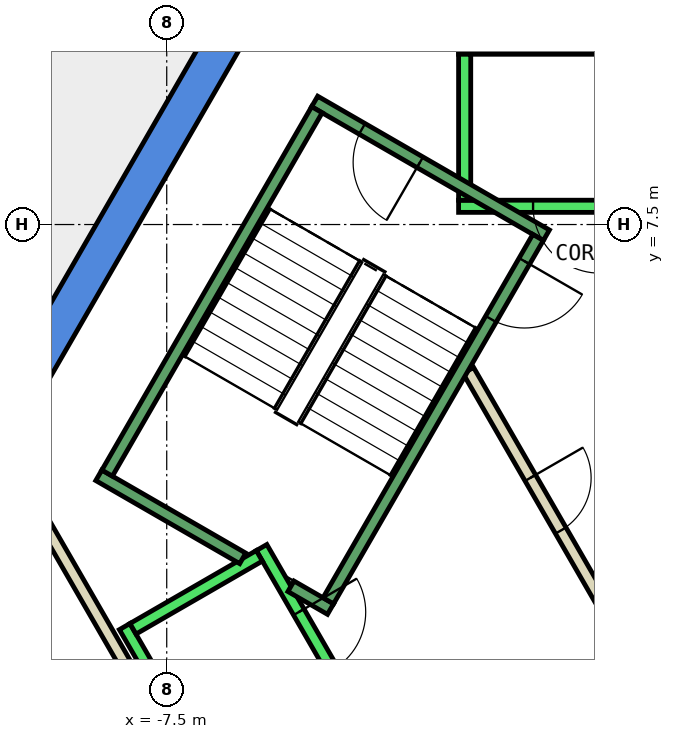
"""IFC4 building model, lengths in metres.
Left out: names, types, materials, properties, quantities, classifications, styles, units other than length and angle.
Written with IfcOpenShell. Run it as: python <this file> out.ifc"""

import sys

from ifc_helpers import new_model, si_unit, direction, frame, frame_2d, origin, place, context, subcontext, project, spatial, polyline, rectangle, outline, extrude, element, fill, save


model = new_model("IFC4")
c1 = context("Model", 3, precision=1e-05, world=origin(), true_north=direction((0.0, 1.0)))
c2 = subcontext(c1, "Body", "Model", "MODEL_VIEW")
j1 = project(units=[si_unit("LENGTHUNIT", "METRE"), si_unit("PLANEANGLEUNIT", "RADIAN")], contexts=[c1])
p1 = place(None, origin())
s1 = spatial("IfcSite", under=j1, at=p1, CompositionType="ELEMENT")
p2 = place(p1, origin())
s2 = spatial("IfcBuilding", under=s1, at=p2, CompositionType="ELEMENT")
p3 = place(p2, frame((0.0, 0.0, 255.8)))
s3 = spatial("IfcBuildingStorey", under=s2, at=p3, CompositionType="ELEMENT", Elevation=255.8)
p4 = place(p3, frame((0.0, 0.0, -0.34)))
e1 = element("IfcWall", 1, at=p4, inside=s3, PredefinedType="SHEAR", context=c2, shape_type="SweptSolid", body=[
    extrude(outline(polyline([(-10.535, 4.253), (-10.015, 3.953), (-5.427, 11.9), (-5.774, 12.5), (-10.535, 4.253)])), origin(), (0.0, 0.0, 1.0), 3.6),
])
p5 = place(p3, frame((0.0, 0.0, -0.34)))
e2 = element("IfcWall", 2, at=p5, inside=s3, PredefinedType="SHEAR", context=c2, shape_type="SweptSolid", body=[
    extrude(outline(polyline([(-11.547, 2.5), (-5.774, -7.5), (-5.427, -6.9), (-10.854, 2.5), (-11.547, 2.5)])), origin(), (0.0, 0.0, 1.0), 3.6),
])
p6 = place(p3, frame((-10.498, 9.689, 0.0), z_axis=(0.0, 0.0, 1.0), x_axis=(0.516353342298, 0.856375633643, 0.0)))
e3 = element("IfcWall", 3, at=p6, inside=s3, PredefinedType="PARTITIONING", context=c2, shape_type="SweptSolid", body=[
    extrude(rectangle(XDim=4.288, YDim=0.2, at=frame_2d((2.144, 0.0))), origin(), (0.0, 0.0, 1.0), 3.26),
])
p7 = place(p6, frame((1.694, 0.0, 0.0)))
e4 = element("IfcOpeningElement", 4, at=p7, cuts=e3, PredefinedType="OPENING", context=c2, shape_type="SweptSolid", body=[
    extrude(rectangle(XDim=1.0, YDim=2.1, at=frame_2d((0.5, 1.05))), frame((0.0, 0.11, 0.0), z_axis=(0.0, -1.0, 0.0), x_axis=(1.0, 0.0, 0.0)), (0.0, 0.0, 1.0), 0.22),
])
p8 = place(p3, frame((-9.751, 2.99, 0.0), z_axis=(0.0, 0.0, 1.0), x_axis=(0.499955951776, -0.866050833545, 0.0)))
e5 = element("IfcWall", 5, at=p8, inside=s3, PredefinedType="PARTITIONING", context=c2, shape_type="SweptSolid", body=[
    extrude(rectangle(XDim=5.4, YDim=0.2, at=frame_2d((2.7, 0.0))), origin(), (0.0, 0.0, 1.0), 3.26),
])
p9 = place(p3, frame((-0.982, -1.0, 0.0), z_axis=(0.0, 0.0, 1.0), x_axis=(0.50024047865, 0.865886518847, 0.0)))
e6 = element("IfcWall", 6, at=p9, inside=s3, PredefinedType="PARTITIONING", context=c2, shape_type="SweptSolid", body=[
    extrude(rectangle(XDim=1.863, YDim=0.2, at=frame_2d((0.931, 0.0))), origin(), (0.0, 0.0, 1.0), 3.26),
])
p10 = place(p3, frame((-2.54, 5.1, 0.0), z_axis=(0.0, 0.0, 1.0), x_axis=(0.499925051871, -0.866068670783, 0.0)))
e7 = element("IfcWall", 7, at=p10, inside=s3, PredefinedType="PARTITIONING", context=c2, shape_type="SweptSolid", body=[
    extrude(rectangle(XDim=5.181, YDim=0.2, at=frame_2d((2.59, 0.0))), origin(), (0.0, 0.0, 1.0), 3.26),
])
p11 = place(p10, frame((2.04, 0.0, 0.0)))
e8 = element("IfcOpeningElement", 8, at=p11, cuts=e7, PredefinedType="OPENING", context=c2, shape_type="SweptSolid", body=[
    extrude(rectangle(XDim=1.0, YDim=2.1, at=frame_2d((0.5, 1.05))), frame((0.0, 0.11, 0.0), z_axis=(0.0, -1.0, 0.0), x_axis=(1.0, 0.0, 0.0)), (0.0, 0.0, 1.0), 0.22),
])
p12 = place(p3, frame((-9.25, -4.879, 0.0), z_axis=(0.0, 0.0, 1.0), x_axis=(-0.499944124422, 0.866057661161, 0.0)))
e9 = element("IfcWall", 9, at=p12, inside=s3, PredefinedType="PARTITIONING", context=c2, shape_type="SweptSolid", body=[
    extrude(rectangle(XDim=7.405, YDim=0.2, at=frame_2d((3.702, 0.0))), origin(), (0.0, 0.0, 1.0), 3.26),
])
p13 = place(p12, frame((2.533, 0.0, 0.0)))
e10 = element("IfcOpeningElement", 10, at=p13, cuts=e9, PredefinedType="OPENING", context=c2, shape_type="SweptSolid", body=[
    extrude(rectangle(XDim=0.9, YDim=2.1, at=frame_2d((0.45, 1.05))), frame((0.0, 0.11, 0.0), z_axis=(0.0, -1.0, 0.0), x_axis=(1.0, 0.0, 0.0)), (0.0, 0.0, 1.0), 0.22),
])
p14 = place(p3, frame((2.7, 7.8, 0.0), z_axis=(0.0, 0.0, 1.0), x_axis=(-1.0, 0.0, 0.0)))
e11 = element("IfcWall", 11, at=p14, inside=s3, PredefinedType="STANDARD", context=c2, shape_type="SweptSolid", body=[
    extrude(rectangle(XDim=5.4, YDim=0.2, at=frame_2d((2.7, 0.0))), origin(), (0.0, 0.0, 1.0), 3.26),
])
p15 = place(p14, frame((1.225, 0.0, 0.0)))
e12 = element("IfcOpeningElement", 12, at=p15, cuts=e11, PredefinedType="OPENING", context=c2, shape_type="SweptSolid", body=[
    extrude(rectangle(XDim=1.1, YDim=2.1, at=frame_2d((0.55, 1.05))), frame((0.0, 0.11, 0.0), z_axis=(0.0, -1.0, 0.0), x_axis=(1.0, 0.0, 0.0)), (0.0, 0.0, 1.0), 0.22),
])
p16 = place(p14, frame((3.075, 0.0, 0.0)))
e13 = element("IfcOpeningElement", 13, at=p16, cuts=e11, PredefinedType="OPENING", context=c2, shape_type="SweptSolid", body=[
    extrude(rectangle(XDim=1.1, YDim=2.1, at=frame_2d((0.55, 1.05))), frame((0.0, 0.11, 0.0), z_axis=(0.0, -1.0, 0.0), x_axis=(1.0, 0.0, 0.0)), (0.0, 0.0, 1.0), 0.22),
])
p17 = place(p3, frame((2.7, 10.4, 0.0), z_axis=(0.0, 0.0, 1.0), x_axis=(-1.0, 0.0, 0.0)))
e14 = element("IfcWall", 14, at=p17, inside=s3, PredefinedType="STANDARD", context=c2, shape_type="SweptSolid", body=[
    extrude(rectangle(XDim=5.4, YDim=0.2, at=frame_2d((2.7, 0.0))), origin(), (0.0, 0.0, 1.0), 3.26),
])
p18 = place(p3, frame((-2.6, 7.9, 0.0), z_axis=(0.0, 0.0, 1.0), x_axis=(0.0, 1.0, 0.0)))
e15 = element("IfcWall", 15, at=p18, inside=s3, PredefinedType="STANDARD", context=c2, shape_type="SweptSolid", body=[
    extrude(rectangle(XDim=2.4, YDim=0.2, at=frame_2d((1.2, 0.0))), origin(), (0.0, 0.0, 1.0), 3.26),
])
p19 = place(p3, frame((-5.94, 2.188, 0.0), z_axis=(0.0, 0.0, 1.0), x_axis=(0.500034260056, -0.866005622828, 0.0)))
e16 = element("IfcWall", 16, at=p19, inside=s3, PredefinedType="STANDARD", context=c2, shape_type="SweptSolid", body=[
    extrude(rectangle(XDim=5.399, YDim=0.2, at=frame_2d((2.7, 0.0))), origin(), (0.0, 0.0, 1.0), 3.26),
])
p20 = place(p19, frame((3.075, 0.0, 0.0)))
e17 = element("IfcOpeningElement", 17, at=p20, cuts=e16, PredefinedType="OPENING", context=c2, shape_type="SweptSolid", body=[
    extrude(rectangle(XDim=1.1, YDim=2.1, at=frame_2d((0.55, 1.05))), frame((0.0, 0.11, 0.0), z_axis=(0.0, -1.0, 0.0), x_axis=(1.0, 0.0, 0.0)), (0.0, 0.0, 1.0), 0.22),
])
p21 = place(p19, frame((1.225, 0.0, 0.0)))
e18 = element("IfcOpeningElement", 18, at=p21, cuts=e16, PredefinedType="OPENING", context=c2, shape_type="SweptSolid", body=[
    extrude(rectangle(XDim=1.1, YDim=2.1, at=frame_2d((0.55, 1.05))), frame((0.0, 0.11, 0.0), z_axis=(0.0, -1.0, 0.0), x_axis=(1.0, 0.0, 0.0)), (0.0, 0.0, 1.0), 0.22),
])
p22 = place(p3, frame((-8.192, 0.888, 0.0), z_axis=(0.0, 0.0, 1.0), x_axis=(0.500034260056, -0.866005622828, 0.0)))
e19 = element("IfcWall", 19, at=p22, inside=s3, PredefinedType="STANDARD", context=c2, shape_type="SweptSolid", body=[
    extrude(rectangle(XDim=5.399, YDim=0.2, at=frame_2d((2.7, 0.0))), origin(), (0.0, 0.0, 1.0), 3.26),
])
p23 = place(p3, frame((-5.977, 2.052, 0.0), z_axis=(0.0, 0.0, 1.0), x_axis=(-0.865973769406, -0.500089422704, 0.0)))
e20 = element("IfcWall", 20, at=p23, inside=s3, PredefinedType="STANDARD", context=c2, shape_type="SweptSolid", body=[
    extrude(rectangle(XDim=2.399, YDim=0.2, at=frame_2d((1.2, 0.0))), origin(), (0.0, 0.0, 1.0), 3.26),
])
p24 = place(p3, frame((-1.256, 7.324, 0.0), z_axis=(0.0, 0.0, 1.0), x_axis=(-0.866046073146, 0.499964197906, 0.0)))
e21 = element("IfcWall", 21, at=p24, inside=s3, PredefinedType="STANDARD", context=c2, shape_type="SweptSolid", body=[
    extrude(rectangle(XDim=4.4, YDim=0.2, at=frame_2d((2.2, 0.0))), origin(), (0.0, 0.0, 1.0), 3.26),
])
p25 = place(p24, frame((2.4, 0.0, 0.0)))
e22 = element("IfcOpeningElement", 22, at=p25, cuts=e21, PredefinedType="OPENING", context=c2, shape_type="SweptSolid", body=[
    extrude(rectangle(XDim=1.1, YDim=2.2, at=frame_2d((0.55, 1.1))), frame((0.0, 0.11, 0.0), z_axis=(0.0, -1.0, 0.0), x_axis=(1.0, 0.0, 0.0)), (0.0, 0.0, 1.0), 0.22),
])
p26 = place(p3, frame((-6.25, 2.01, 0.0), z_axis=(0.0, 0.0, 1.0), x_axis=(-0.86611865017, 0.499838457731, 0.0)))
e23 = element("IfcWall", 23, at=p26, inside=s3, PredefinedType="STANDARD", context=c2, shape_type="SweptSolid", body=[
    extrude(rectangle(XDim=2.733, YDim=0.2, at=frame_2d((1.366, 0.0))), origin(), (0.0, 0.0, 1.0), 3.26),
])
p27 = place(p3, frame((-4.806, 1.176, 0.0), z_axis=(0.0, 0.0, 1.0), x_axis=(-0.866558586415, 0.499075361355, 0.0)))
e24 = element("IfcWall", 24, at=p27, inside=s3, PredefinedType="STANDARD", context=c2, shape_type="SweptSolid", body=[
    extrude(rectangle(XDim=0.751, YDim=0.2, at=frame_2d((0.376, 0.0))), origin(), (0.0, 0.0, 1.0), 3.26),
])
p28 = place(p3, frame((-1.393, 7.288, 0.0), z_axis=(0.0, 0.0, 1.0), x_axis=(-0.499963383562, -0.866046543262, 0.0)))
e25 = element("IfcWall", 25, at=p28, inside=s3, PredefinedType="STANDARD", context=c2, shape_type="SweptSolid", body=[
    extrude(rectangle(XDim=6.9, YDim=0.2, at=frame_2d((3.45, 0.0))), origin(), (0.0, 0.0, 1.0), 3.26),
])
p29 = place(p28, frame((0.45, 0.0, 0.0)))
e26 = element("IfcOpeningElement", 26, at=p29, cuts=e25, PredefinedType="OPENING", context=c2, shape_type="SweptSolid", body=[
    extrude(rectangle(XDim=1.1, YDim=2.2, at=frame_2d((0.55, 1.1))), frame((0.0, 0.11, 0.0), z_axis=(0.0, -1.0, 0.0), x_axis=(1.0, 0.0, 0.0)), (0.0, 0.0, 1.0), 0.22),
])
p30 = place(p3, frame((-5.03, 9.388, 0.0), z_axis=(0.0, 0.0, 1.0), x_axis=(-0.499978703459, -0.866037698999, 0.0)))
e27 = element("IfcWall", 27, at=p30, inside=s3, PredefinedType="STANDARD", context=c2, shape_type="SweptSolid", body=[
    extrude(rectangle(XDim=6.9, YDim=0.2, at=frame_2d((3.45, 0.0))), origin(), (0.0, 0.0, 1.0), 3.26),
])
p31 = place(p11, origin())
e28 = element("IfcDoor", 28, at=p31, inside=s3, OperationType="SINGLE_SWING_RIGHT", PredefinedType="DOOR", context=c2, shape_type="SweptSolid", body=[
    extrude(rectangle(XDim=1.0, YDim=2.1, at=frame_2d((0.5, 1.05))), frame((0.0, 0.025, 0.0), z_axis=(0.0, -1.0, 0.0), x_axis=(1.0, 0.0, 0.0)), (0.0, 0.0, 1.0), 0.05),
])
fill(e8, e28)
p32 = place(p16, origin())
e29 = element("IfcDoor", 29, at=p32, inside=s3, OperationType="SLIDING_TO_LEFT", PredefinedType="DOOR", context=c2, shape_type="SweptSolid", body=[
    extrude(rectangle(XDim=1.1, YDim=2.1, at=frame_2d((0.55, 1.05))), frame((0.0, 0.025, 0.0), z_axis=(0.0, -1.0, 0.0), x_axis=(1.0, 0.0, 0.0)), (0.0, 0.0, 1.0), 0.05),
])
fill(e13, e29)
p33 = place(p21, origin())
e30 = element("IfcDoor", 30, at=p33, inside=s3, OperationType="SLIDING_TO_LEFT", PredefinedType="DOOR", context=c2, shape_type="SweptSolid", body=[
    extrude(rectangle(XDim=1.1, YDim=2.1, at=frame_2d((0.55, 1.05))), frame((0.0, 0.025, 0.0), z_axis=(0.0, -1.0, 0.0), x_axis=(1.0, 0.0, 0.0)), (0.0, 0.0, 1.0), 0.05),
])
fill(e18, e30)
p34 = place(p29, origin())
e31 = element("IfcDoor", 31, at=p34, inside=s3, OperationType="SINGLE_SWING_LEFT", PredefinedType="DOOR", context=c2, shape_type="SweptSolid", body=[
    extrude(rectangle(XDim=1.1, YDim=2.2, at=frame_2d((0.55, 1.1))), frame((0.0, 0.025, 0.0), z_axis=(0.0, -1.0, 0.0), x_axis=(1.0, 0.0, 0.0)), (0.0, 0.0, 1.0), 0.05),
])
fill(e26, e31)
p35 = place(p25, origin())
e32 = element("IfcDoor", 32, at=p35, inside=s3, OperationType="SINGLE_SWING_LEFT", PredefinedType="DOOR", context=c2, shape_type="SweptSolid", body=[
    extrude(rectangle(XDim=1.1, YDim=2.2, at=frame_2d((0.55, 1.1))), frame((0.0, 0.025, 0.0), z_axis=(0.0, -1.0, 0.0), x_axis=(1.0, 0.0, 0.0)), (0.0, 0.0, 1.0), 0.05),
])
fill(e22, e32)
save(model, sys.argv[1])
